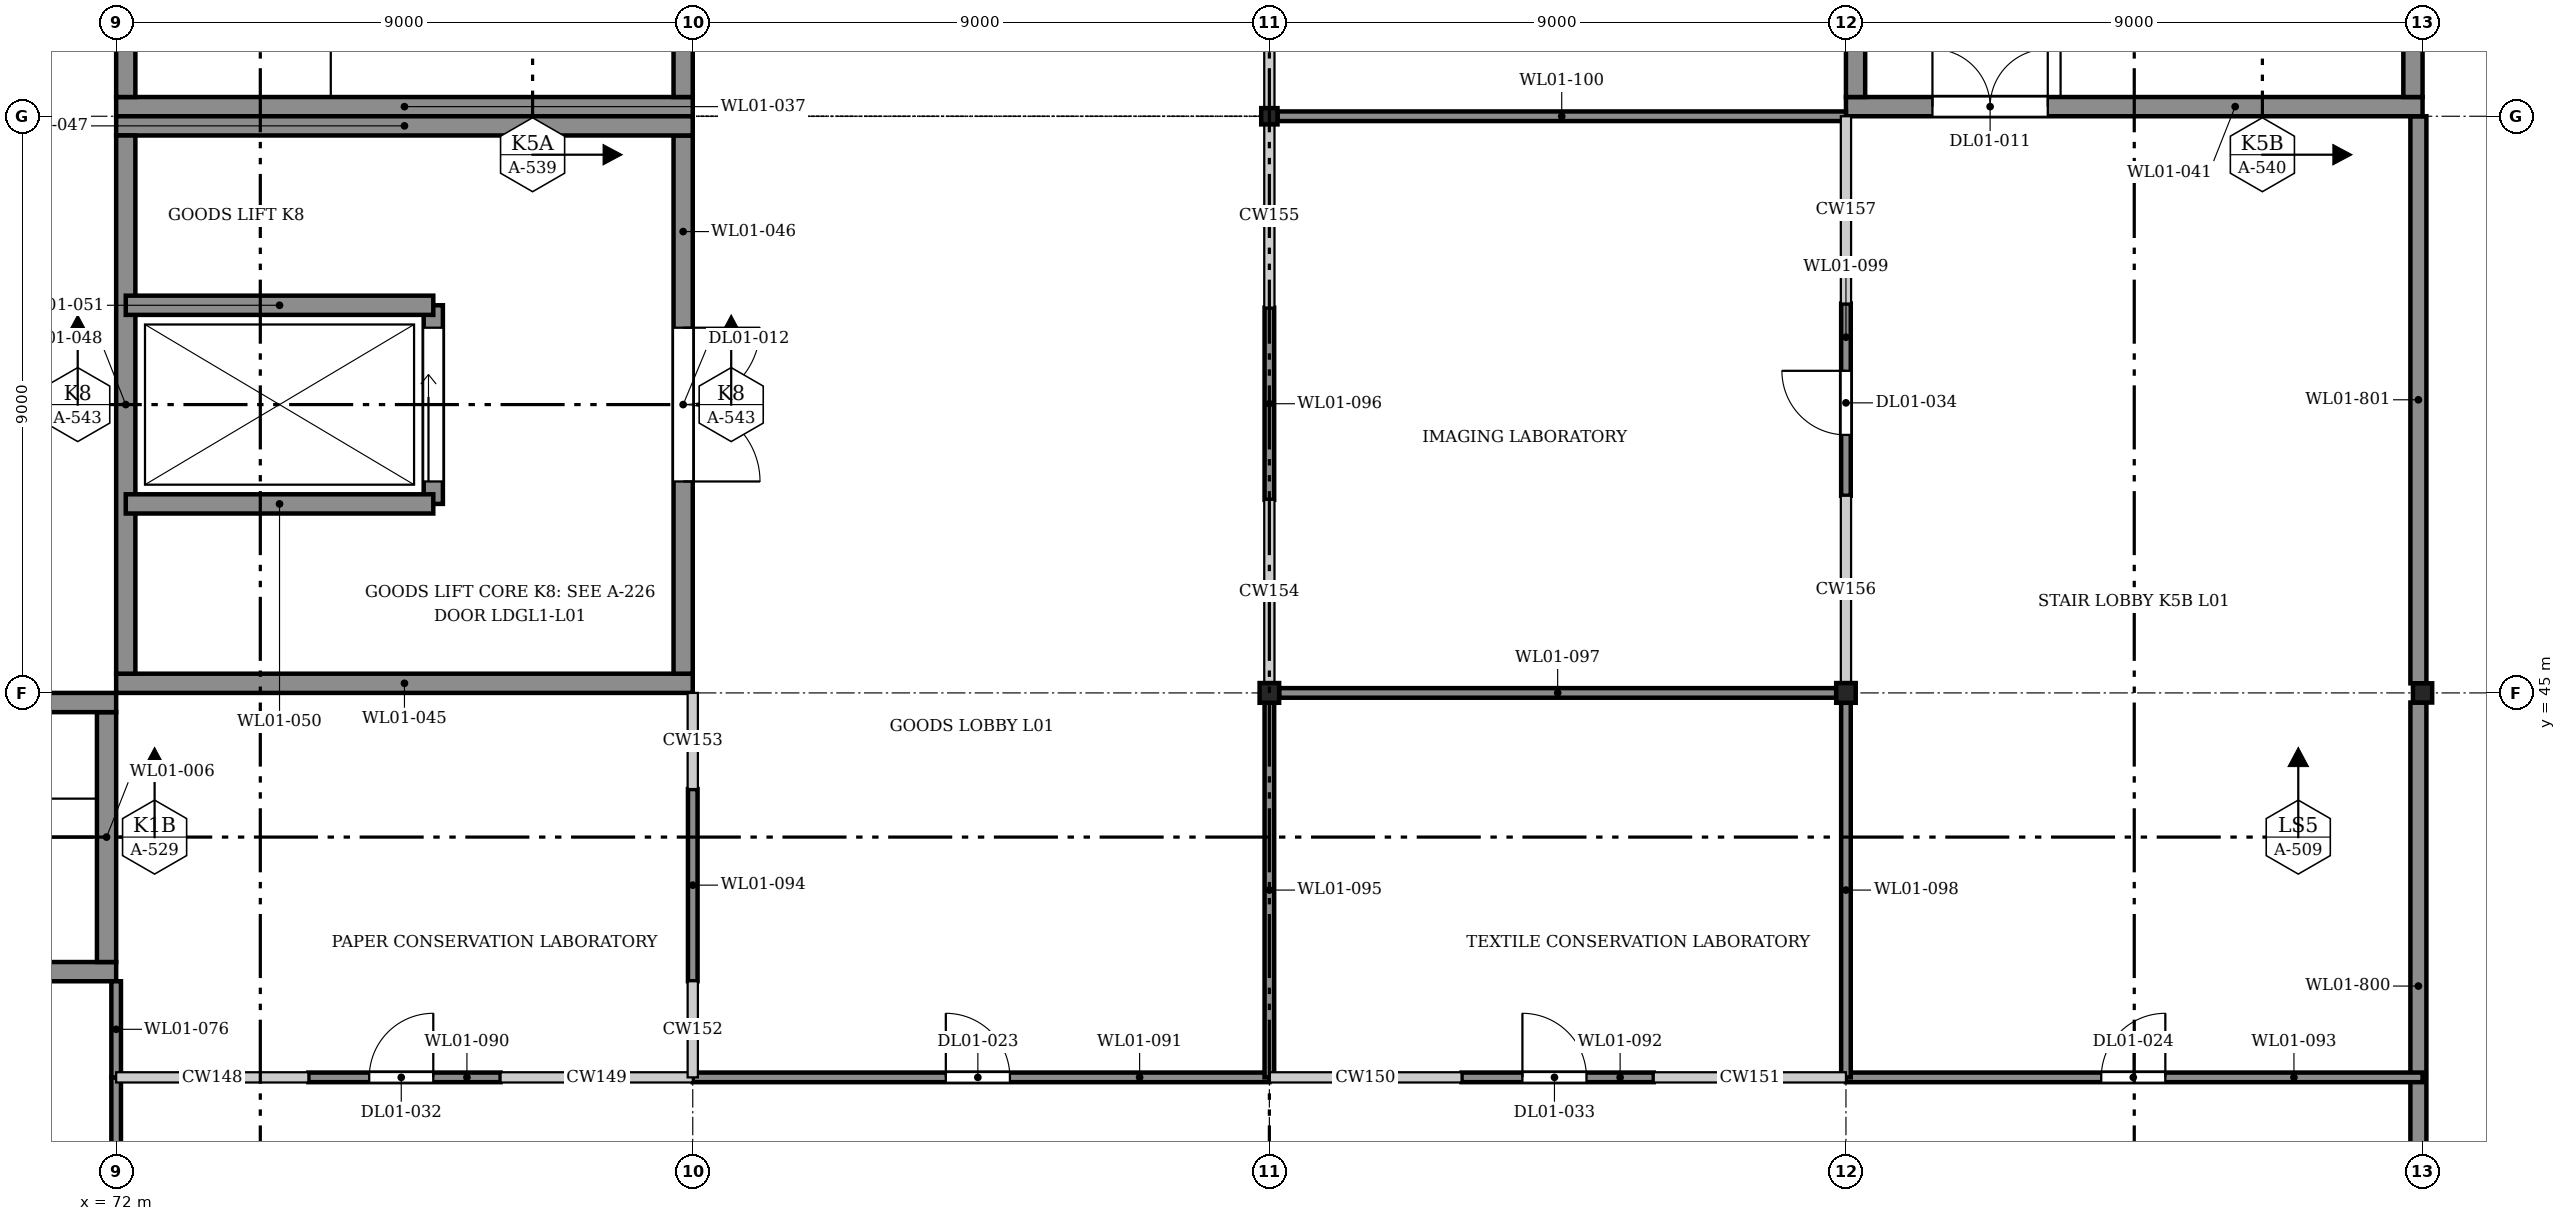
"""IFC4 building model, lengths in metres.
Left out: names, types, materials, properties, quantities, classifications, styles, units other than length and angle.
Written with IfcOpenShell. Run it as: python <this file> out.ifc"""

import sys

from ifc_helpers import new_model, si_unit, direction, frame, frame_2d, origin, origin_2d, place, context, subcontext, project, spatial, rectangle, hollow_rectangle, i_section, extrude, element, fill, save


model = new_model("IFC4")
c1 = context("Model", 3, precision=1e-05, world=origin(), true_north=direction((0.0, 1.0)))
c2 = subcontext(c1, "Body", "Model", "MODEL_VIEW")
j1 = project(units=[si_unit("LENGTHUNIT", "METRE"), si_unit("PLANEANGLEUNIT", "RADIAN")], contexts=[c1])
p1 = place(None, origin())
s1 = spatial("IfcSite", under=j1, at=p1, CompositionType="ELEMENT")
p2 = place(p1, origin())
s2 = spatial("IfcBuilding", under=s1, at=p2, CompositionType="ELEMENT")
p3 = place(p2, frame((0.0, 0.0, 5.0)))
s3 = spatial("IfcBuildingStorey", under=s2, at=p3, CompositionType="ELEMENT", Elevation=5.0)
for number, where, z_axis, x_axis in (
    (1, (90.0, 45.0, 0.0), (0.0, 0.0, 1.0), (1.0, 0.0, 0.0)),
    (2, (99.0, 45.0, 0.0), (0.0, 0.0, 1.0), (1.0, 0.0, 0.0)),
):
    element("IfcColumn", number, at=place(p3, frame(where, z_axis=z_axis, x_axis=x_axis)), inside=s3, PredefinedType="COLUMN", context=c2, shape_type="SweptSolid", body=[
        extrude(i_section(OverallWidth=0.305, OverallDepth=0.308, WebThickness=0.01, FlangeThickness=0.015, FilletRadius=0.017, at=origin_2d()), origin(), (0.0, 0.0, 1.0), 4.2),
    ])
p4 = place(p3, frame((108.0, 45.0, 0.0), z_axis=(0.0, 0.0, 1.0), x_axis=(1.0, 0.0, 0.0)))
e3 = element("IfcColumn", 3, at=p4, inside=s3, PredefinedType="COLUMN", context=c2, shape_type="SweptSolid", body=[
    extrude(hollow_rectangle(XDim=0.3, YDim=0.3, WallThickness=0.01, InnerFilletRadius=0.015, OuterFilletRadius=0.025, at=origin_2d()), origin(), (0.0, 0.0, 1.0), 4.2),
])
p5 = place(p3, frame((90.0, 54.0, 0.0), z_axis=(0.0, 0.0, 1.0), x_axis=(1.0, 0.0, 0.0)))
e4 = element("IfcColumn", 4, at=p5, inside=s3, PredefinedType="COLUMN", context=c2, shape_type="SweptSolid", body=[
    extrude(i_section(OverallWidth=0.254, OverallDepth=0.254, WebThickness=0.009, FlangeThickness=0.014, FilletRadius=0.014, at=origin_2d()), origin(), (0.0, 0.0, 1.0), 3.9),
])
for number, where, z_axis, x_axis in (
    (5, (107.935, 36.0, 0.0), (0.0, 0.0, 1.0), (0.0, 1.0, 0.0)),
    (6, (107.935, 45.15, 0.0), (0.0, 0.0, 1.0), (0.0, 1.0, 0.0)),
):
    element("IfcWall", number, at=place(p3, frame(where, z_axis=z_axis, x_axis=x_axis)), inside=s3, PredefinedType="SOLIDWALL", context=c2, shape_type="SweptSolid", body=[
        extrude(rectangle(XDim=8.85, YDim=0.25, at=frame_2d((4.425, 0.0))), origin(), (0.0, 0.0, 1.0), 3.25),
    ])
p6 = place(p3, frame((63.0, 40.65, 0.0), z_axis=(0.0, 0.0, 1.0), x_axis=(1.0, 0.0, 0.0)))
e7 = element("IfcWall", 7, at=p6, inside=s3, PredefinedType="SOLIDWALL", context=c2, shape_type="SweptSolid", body=[
    extrude(rectangle(XDim=9.0, YDim=0.3, at=frame_2d((4.5, 0.0))), origin(), (0.0, 0.0, 1.0), 4.2),
])
p7 = place(p3, frame((71.85, 40.8, 0.0), z_axis=(0.0, 0.0, 1.0), x_axis=(0.0, 1.0, 0.0)))
e8 = element("IfcWall", 8, at=p7, inside=s3, PredefinedType="SOLIDWALL", context=c2, shape_type="SweptSolid", body=[
    extrude(rectangle(XDim=3.9, YDim=0.3, at=frame_2d((1.95, 0.0))), origin(), (0.0, 0.0, 1.0), 4.2),
])
for number, where, z_axis, x_axis in (
    (9, (63.0, 44.85, 0.0), (0.0, 0.0, 1.0), (1.0, 0.0, 0.0)),
    (10, (72.0, 54.15, 0.0), (0.0, 0.0, 1.0), (1.0, 0.0, 0.0)),
):
    element("IfcWall", number, at=place(p3, frame(where, z_axis=z_axis, x_axis=x_axis)), inside=s3, PredefinedType="SOLIDWALL", context=c2, shape_type="SweptSolid", body=[
        extrude(rectangle(XDim=9.0, YDim=0.3, at=frame_2d((4.5, 0.0))), origin(), (0.0, 0.0, 1.0), 4.2),
    ])
p8 = place(p3, frame((80.85, 54.3, 0.0), z_axis=(0.0, 0.0, 1.0), x_axis=(0.0, 1.0, 0.0)))
e11 = element("IfcWall", 11, at=p8, inside=s3, PredefinedType="SOLIDWALL", context=c2, shape_type="SweptSolid", body=[
    extrude(rectangle(XDim=8.4, YDim=0.3, at=frame_2d((4.2, 0.0))), origin(), (0.0, 0.0, 1.0), 4.2),
])
p9 = place(p8, frame((3.65, 0.0, 0.0)))
e12 = element("IfcOpeningElement", 12, at=p9, cuts=e11, PredefinedType="OPENING", context=c2, shape_type="SweptSolid", body=[
    extrude(rectangle(XDim=1.8, YDim=2.1, at=frame_2d((0.9, 1.05))), frame((0.0, 0.16, 0.0), z_axis=(0.0, -1.0, 0.0), x_axis=(1.0, 0.0, 0.0)), (0.0, 0.0, 1.0), 0.32),
])
p10 = place(p3, frame((72.15, 54.3, 0.0), z_axis=(0.0, 0.0, 1.0), x_axis=(0.0, 1.0, 0.0)))
e13 = element("IfcWall", 13, at=p10, inside=s3, PredefinedType="SOLIDWALL", context=c2, shape_type="SweptSolid", body=[
    extrude(rectangle(XDim=8.4, YDim=0.3, at=frame_2d((4.2, 0.0))), origin(), (0.0, 0.0, 1.0), 4.2),
])
p11 = place(p3, frame((99.0, 54.15, 0.0), z_axis=(0.0, 0.0, 1.0), x_axis=(1.0, 0.0, 0.0)))
e14 = element("IfcWall", 14, at=p11, inside=s3, PredefinedType="SOLIDWALL", context=c2, shape_type="SweptSolid", body=[
    extrude(rectangle(XDim=9.0, YDim=0.3, at=frame_2d((4.5, 0.0))), origin(), (0.0, 0.0, 1.0), 4.2),
])
p12 = place(p11, frame((1.35, 0.0, 0.0)))
e15 = element("IfcOpeningElement", 15, at=p12, cuts=e14, PredefinedType="OPENING", context=c2, shape_type="SweptSolid", body=[
    extrude(rectangle(XDim=1.8, YDim=2.1, at=frame_2d((0.9, 1.05))), frame((0.0, 0.16, 0.0), z_axis=(0.0, -1.0, 0.0), x_axis=(1.0, 0.0, 0.0)), (0.0, 0.0, 1.0), 0.32),
])
for number, where, z_axis, x_axis in (
    (16, (107.85, 54.3, 0.0), (0.0, 0.0, 1.0), (0.0, 1.0, 0.0)),
    (17, (99.15, 54.3, 0.0), (0.0, 0.0, 1.0), (0.0, 1.0, 0.0)),
):
    element("IfcWall", number, at=place(p3, frame(where, z_axis=z_axis, x_axis=x_axis)), inside=s3, PredefinedType="SOLIDWALL", context=c2, shape_type="SweptSolid", body=[
        extrude(rectangle(XDim=8.4, YDim=0.3, at=frame_2d((4.2, 0.0))), origin(), (0.0, 0.0, 1.0), 4.2),
    ])
p13 = place(p3, frame((72.0, 45.15, 0.0), z_axis=(0.0, 0.0, 1.0), x_axis=(1.0, 0.0, 0.0)))
e18 = element("IfcWall", 18, at=p13, inside=s3, PredefinedType="SOLIDWALL", context=c2, shape_type="SweptSolid", body=[
    extrude(rectangle(XDim=9.0, YDim=0.3, at=frame_2d((4.5, 0.0))), origin(), (0.0, 0.0, 1.0), 4.2),
])
p14 = place(p3, frame((80.85, 45.3, 0.0), z_axis=(0.0, 0.0, 1.0), x_axis=(0.0, 1.0, 0.0)))
e19 = element("IfcWall", 19, at=p14, inside=s3, PredefinedType="SOLIDWALL", context=c2, shape_type="SweptSolid", body=[
    extrude(rectangle(XDim=8.4, YDim=0.3, at=frame_2d((4.2, 0.0))), origin(), (0.0, 0.0, 1.0), 4.2),
])
p15 = place(p14, frame((3.0, 0.0, 0.0)))
e20 = element("IfcOpeningElement", 20, at=p15, cuts=e19, PredefinedType="OPENING", context=c2, shape_type="SweptSolid", body=[
    extrude(rectangle(XDim=2.4, YDim=2.4, at=frame_2d((1.2, 1.2))), frame((0.0, 0.16, 0.0), z_axis=(0.0, -1.0, 0.0), x_axis=(1.0, 0.0, 0.0)), (0.0, 0.0, 1.0), 0.32),
])
p16 = place(p3, frame((72.0, 53.85, 0.0), z_axis=(0.0, 0.0, 1.0), x_axis=(1.0, 0.0, 0.0)))
e21 = element("IfcWall", 21, at=p16, inside=s3, PredefinedType="SOLIDWALL", context=c2, shape_type="SweptSolid", body=[
    extrude(rectangle(XDim=9.0, YDim=0.3, at=frame_2d((4.5, 0.0))), origin(), (0.0, 0.0, 1.0), 4.2),
])
p17 = place(p3, frame((72.15, 45.3, 0.0), z_axis=(0.0, 0.0, 1.0), x_axis=(0.0, 1.0, 0.0)))
e22 = element("IfcWall", 22, at=p17, inside=s3, PredefinedType="SOLIDWALL", context=c2, shape_type="SweptSolid", body=[
    extrude(rectangle(XDim=8.4, YDim=0.3, at=frame_2d((4.2, 0.0))), origin(), (0.0, 0.0, 1.0), 4.2),
])
p18 = place(p3, frame((76.95, 47.95, 0.0), z_axis=(0.0, 0.0, 1.0), x_axis=(0.0, 1.0, 0.0)))
e23 = element("IfcWall", 23, at=p18, inside=s3, PredefinedType="SOLIDWALL", context=c2, shape_type="SweptSolid", body=[
    extrude(rectangle(XDim=3.1, YDim=0.3, at=frame_2d((1.55, 0.0))), origin(), (0.0, 0.0, 1.0), 4.2),
])
p19 = place(p18, frame((0.35, 0.0, 0.0)))
e24 = element("IfcOpeningElement", 24, at=p19, cuts=e23, PredefinedType="OPENING", context=c2, shape_type="SweptSolid", body=[
    extrude(rectangle(XDim=2.4, YDim=2.4, at=frame_2d((1.2, 1.2))), frame((0.0, 0.16, 0.0), z_axis=(0.0, -1.0, 0.0), x_axis=(1.0, 0.0, 0.0)), (0.0, 0.0, 1.0), 0.32),
])
for number, where, z_axis, x_axis in (
    (25, (72.15, 47.95, 0.0), (0.0, 0.0, 1.0), (1.0, 0.0, 0.0)),
    (26, (72.15, 51.05, 0.0), (0.0, 0.0, 1.0), (1.0, 0.0, 0.0)),
):
    element("IfcWall", number, at=place(p3, frame(where, z_axis=z_axis, x_axis=x_axis)), inside=s3, PredefinedType="SOLIDWALL", context=c2, shape_type="SweptSolid", body=[
        extrude(rectangle(XDim=4.8, YDim=0.3, at=frame_2d((2.4, 0.0))), origin(), (0.0, 0.0, 1.0), 4.2),
    ])
p20 = place(p3, frame((72.0, 36.0, 0.0), z_axis=(0.0, 0.0, 1.0), x_axis=(0.0, 1.0, 0.0)))
e27 = element("IfcWall", 27, at=p20, inside=s3, PredefinedType="PARTITIONING", context=c2, shape_type="SweptSolid", body=[
    extrude(rectangle(XDim=3.0, YDim=0.15, at=frame_2d((1.5, 0.0))), origin(), (0.0, 0.0, 1.0), 3.158),
])
p21 = place(p3, frame((72.0, 39.0, 0.0), z_axis=(0.0, 0.0, 1.0), x_axis=(0.0, 1.0, 0.0)))
e28 = element("IfcWall", 28, at=p21, inside=s3, PredefinedType="PARTITIONING", context=c2, shape_type="SweptSolid", body=[
    extrude(rectangle(XDim=1.5, YDim=0.15, at=frame_2d((0.75, 0.0))), origin(), (0.0, 0.0, 1.0), 3.158),
])
p22 = place(p3, frame((75.0, 39.0, 0.0), z_axis=(0.0, 0.0, 1.0), x_axis=(1.0, 0.0, 0.0)))
e29 = element("IfcWall", 29, at=p22, inside=s3, PredefinedType="PARTITIONING", context=c2, shape_type="SweptSolid", body=[
    extrude(rectangle(XDim=3.0, YDim=0.15, at=frame_2d((1.5, 0.0))), origin(), (0.0, 0.0, 1.0), 3.158),
])
p23 = place(p22, frame((0.95, 0.0, 0.0)))
e30 = element("IfcOpeningElement", 30, at=p23, cuts=e29, PredefinedType="OPENING", context=c2, shape_type="SweptSolid", body=[
    extrude(rectangle(XDim=1.0, YDim=2.1, at=frame_2d((0.5, 1.05))), frame((0.0, 0.085, 0.0), z_axis=(0.0, -1.0, 0.0), x_axis=(1.0, 0.0, 0.0)), (0.0, 0.0, 1.0), 0.17),
])
p24 = place(p3, frame((81.0, 39.0, 0.0), z_axis=(0.0, 0.0, 1.0), x_axis=(1.0, 0.0, 0.0)))
e31 = element("IfcWall", 31, at=p24, inside=s3, PredefinedType="PARTITIONING", context=c2, shape_type="SweptSolid", body=[
    extrude(rectangle(XDim=9.0, YDim=0.15, at=frame_2d((4.5, 0.0))), origin(), (0.0, 0.0, 1.0), 3.158),
])
p25 = place(p24, frame((3.95, 0.0, 0.0)))
e32 = element("IfcOpeningElement", 32, at=p25, cuts=e31, PredefinedType="OPENING", context=c2, shape_type="SweptSolid", body=[
    extrude(rectangle(XDim=1.0, YDim=2.1, at=frame_2d((0.5, 1.05))), frame((0.0, 0.085, 0.0), z_axis=(0.0, -1.0, 0.0), x_axis=(1.0, 0.0, 0.0)), (0.0, 0.0, 1.0), 0.17),
])
p26 = place(p3, frame((93.0, 39.0, 0.0), z_axis=(0.0, 0.0, 1.0), x_axis=(1.0, 0.0, 0.0)))
e33 = element("IfcWall", 33, at=p26, inside=s3, PredefinedType="PARTITIONING", context=c2, shape_type="SweptSolid", body=[
    extrude(rectangle(XDim=3.0, YDim=0.15, at=frame_2d((1.5, 0.0))), origin(), (0.0, 0.0, 1.0), 3.158),
])
p27 = place(p26, frame((0.95, 0.0, 0.0)))
e34 = element("IfcOpeningElement", 34, at=p27, cuts=e33, PredefinedType="OPENING", context=c2, shape_type="SweptSolid", body=[
    extrude(rectangle(XDim=1.0, YDim=2.1, at=frame_2d((0.5, 1.05))), frame((0.0, 0.085, 0.0), z_axis=(0.0, -1.0, 0.0), x_axis=(1.0, 0.0, 0.0)), (0.0, 0.0, 1.0), 0.17),
])
p28 = place(p3, frame((99.0, 39.0, 0.0), z_axis=(0.0, 0.0, 1.0), x_axis=(1.0, 0.0, 0.0)))
e35 = element("IfcWall", 35, at=p28, inside=s3, PredefinedType="PARTITIONING", context=c2, shape_type="SweptSolid", body=[
    extrude(rectangle(XDim=9.0, YDim=0.15, at=frame_2d((4.5, 0.0))), origin(), (0.0, 0.0, 1.0), 3.158),
])
p29 = place(p28, frame((3.985, 0.0, 0.0)))
e36 = element("IfcOpeningElement", 36, at=p29, cuts=e35, PredefinedType="OPENING", context=c2, shape_type="SweptSolid", body=[
    extrude(rectangle(XDim=1.0, YDim=2.1, at=frame_2d((0.5, 1.05))), frame((0.0, 0.085, 0.0), z_axis=(0.0, -1.0, 0.0), x_axis=(1.0, 0.0, 0.0)), (0.0, 0.0, 1.0), 0.17),
])
p30 = place(p3, frame((81.0, 40.5, 0.0), z_axis=(0.0, 0.0, 1.0), x_axis=(0.0, 1.0, 0.0)))
e37 = element("IfcWall", 37, at=p30, inside=s3, PredefinedType="PARTITIONING", context=c2, shape_type="SweptSolid", body=[
    extrude(rectangle(XDim=3.0, YDim=0.15, at=frame_2d((1.5, 0.0))), origin(), (0.0, 0.0, 1.0), 2.95),
])
p31 = place(p3, frame((90.0, 39.0, 0.0), z_axis=(0.0, 0.0, 1.0), x_axis=(0.0, 1.0, 0.0)))
e38 = element("IfcWall", 38, at=p31, inside=s3, PredefinedType="PARTITIONING", context=c2, shape_type="SweptSolid", body=[
    extrude(rectangle(XDim=5.846, YDim=0.15, at=frame_2d((2.923, 0.0))), origin(), (0.0, 0.0, 1.0), 3.158),
])
p32 = place(p3, frame((90.0, 48.014, 0.0), z_axis=(0.0, 0.0, 1.0), x_axis=(0.0, 1.0, 0.0)))
e39 = element("IfcWall", 39, at=p32, inside=s3, PredefinedType="PARTITIONING", context=c2, shape_type="SweptSolid", body=[
    extrude(rectangle(XDim=3.0, YDim=0.15, at=frame_2d((1.5, 0.0))), origin(), (0.0, 0.0, 1.0), 2.858),
])
p33 = place(p3, frame((90.153, 45.0, 0.0), z_axis=(0.0, 0.0, 1.0), x_axis=(1.0, 0.0, 0.0)))
e40 = element("IfcWall", 40, at=p33, inside=s3, PredefinedType="PARTITIONING", context=c2, shape_type="SweptSolid", body=[
    extrude(rectangle(XDim=8.695, YDim=0.15, at=frame_2d((4.347, 0.0))), origin(), (0.0, 0.0, 1.0), 2.95),
])
p34 = place(p3, frame((99.0, 39.0, 0.0), z_axis=(0.0, 0.0, 1.0), x_axis=(0.0, 1.0, 0.0)))
e41 = element("IfcWall", 41, at=p34, inside=s3, PredefinedType="PARTITIONING", context=c2, shape_type="SweptSolid", body=[
    extrude(rectangle(XDim=5.846, YDim=0.15, at=frame_2d((2.923, 0.0))), origin(), (0.0, 0.0, 1.0), 3.158),
])
p35 = place(p3, frame((99.0, 48.077, 0.0), z_axis=(0.0, 0.0, 1.0), x_axis=(0.0, 1.0, 0.0)))
e42 = element("IfcWall", 42, at=p35, inside=s3, PredefinedType="PARTITIONING", context=c2, shape_type="SweptSolid", body=[
    extrude(rectangle(XDim=3.0, YDim=0.15, at=frame_2d((1.5, 0.0))), origin(), (0.0, 0.0, 1.0), 2.858),
])
p36 = place(p35, frame((0.95, 0.0, 0.0)))
e43 = element("IfcOpeningElement", 43, at=p36, cuts=e42, PredefinedType="OPENING", context=c2, shape_type="SweptSolid", body=[
    extrude(rectangle(XDim=1.0, YDim=2.1, at=frame_2d((0.5, 1.05))), frame((0.0, 0.085, 0.0), z_axis=(0.0, -1.0, 0.0), x_axis=(1.0, 0.0, 0.0)), (0.0, 0.0, 1.0), 0.17),
])
p37 = place(p3, frame((90.127, 54.0, 0.0), z_axis=(0.0, 0.0, 1.0), x_axis=(1.0, 0.0, 0.0)))
e44 = element("IfcWall", 44, at=p37, inside=s3, PredefinedType="PARTITIONING", context=c2, shape_type="SweptSolid", body=[
    extrude(rectangle(XDim=8.873, YDim=0.15, at=frame_2d((4.437, 0.0))), origin(), (0.0, 0.0, 1.0), 2.858),
])
p38 = place(p12, origin())
e45 = element("IfcDoor", 45, at=p38, inside=s3, OperationType="DOUBLE_DOOR_SINGLE_SWING", PredefinedType="DOOR", context=c2, shape_type="SweptSolid", body=[
    extrude(rectangle(XDim=1.8, YDim=2.1, at=frame_2d((0.9, 1.05))), frame((0.0, 0.025, 0.0), z_axis=(0.0, -1.0, 0.0), x_axis=(1.0, 0.0, 0.0)), (0.0, 0.0, 1.0), 0.05),
])
fill(e15, e45)
p39 = place(p19, origin())
e46 = element("IfcDoor", 46, at=p39, inside=s3, OperationType="DOUBLE_DOOR_SLIDING", PredefinedType="DOOR", context=c2, shape_type="SweptSolid", body=[
    extrude(rectangle(XDim=2.4, YDim=2.4, at=frame_2d((1.2, 1.2))), frame((0.0, 0.025, 0.0), z_axis=(0.0, -1.0, 0.0), x_axis=(1.0, 0.0, 0.0)), (0.0, 0.0, 1.0), 0.05),
])
fill(e24, e46)
p40 = place(p15, frame((2.4, 0.0, 0.0), z_axis=(0.0, 0.0, 1.0), x_axis=(-1.0, 0.0, 0.0)))
e47 = element("IfcDoor", 47, at=p40, inside=s3, OperationType="DOUBLE_DOOR_SINGLE_SWING", PredefinedType="DOOR", context=c2, shape_type="SweptSolid", body=[
    extrude(rectangle(XDim=2.4, YDim=2.4, at=frame_2d((1.2, 1.2))), frame((0.0, 0.025, 0.0), z_axis=(0.0, -1.0, 0.0), x_axis=(1.0, 0.0, 0.0)), (0.0, 0.0, 1.0), 0.05),
])
fill(e20, e47)
p41 = place(p25, origin())
e48 = element("IfcDoor", 48, at=p41, inside=s3, OperationType="SINGLE_SWING_RIGHT", PredefinedType="DOOR", context=c2, shape_type="SweptSolid", body=[
    extrude(rectangle(XDim=1.0, YDim=2.1, at=frame_2d((0.5, 1.05))), frame((0.0, 0.025, 0.0), z_axis=(0.0, -1.0, 0.0), x_axis=(1.0, 0.0, 0.0)), (0.0, 0.0, 1.0), 0.05),
])
fill(e32, e48)
p42 = place(p29, origin())
e49 = element("IfcDoor", 49, at=p42, inside=s3, OperationType="SINGLE_SWING_LEFT", PredefinedType="DOOR", context=c2, shape_type="SweptSolid", body=[
    extrude(rectangle(XDim=1.0, YDim=2.1, at=frame_2d((0.5, 1.05))), frame((0.0, 0.025, 0.0), z_axis=(0.0, -1.0, 0.0), x_axis=(1.0, 0.0, 0.0)), (0.0, 0.0, 1.0), 0.05),
])
fill(e36, e49)
p43 = place(p23, origin())
e50 = element("IfcDoor", 50, at=p43, inside=s3, OperationType="SINGLE_SWING_LEFT", PredefinedType="DOOR", context=c2, shape_type="SweptSolid", body=[
    extrude(rectangle(XDim=1.0, YDim=2.1, at=frame_2d((0.5, 1.05))), frame((0.0, 0.025, 0.0), z_axis=(0.0, -1.0, 0.0), x_axis=(1.0, 0.0, 0.0)), (0.0, 0.0, 1.0), 0.05),
])
fill(e30, e50)
p44 = place(p27, origin())
e51 = element("IfcDoor", 51, at=p44, inside=s3, OperationType="SINGLE_SWING_RIGHT", PredefinedType="DOOR", context=c2, shape_type="SweptSolid", body=[
    extrude(rectangle(XDim=1.0, YDim=2.1, at=frame_2d((0.5, 1.05))), frame((0.0, 0.025, 0.0), z_axis=(0.0, -1.0, 0.0), x_axis=(1.0, 0.0, 0.0)), (0.0, 0.0, 1.0), 0.05),
])
fill(e34, e51)
p45 = place(p36, origin())
e52 = element("IfcDoor", 52, at=p45, inside=s3, OperationType="SINGLE_SWING_LEFT", PredefinedType="DOOR", context=c2, shape_type="SweptSolid", body=[
    extrude(rectangle(XDim=1.0, YDim=2.1, at=frame_2d((0.5, 1.05))), frame((0.0, 0.025, 0.0), z_axis=(0.0, -1.0, 0.0), x_axis=(1.0, 0.0, 0.0)), (0.0, 0.0, 1.0), 0.05),
])
fill(e43, e52)
save(model, sys.argv[1])
